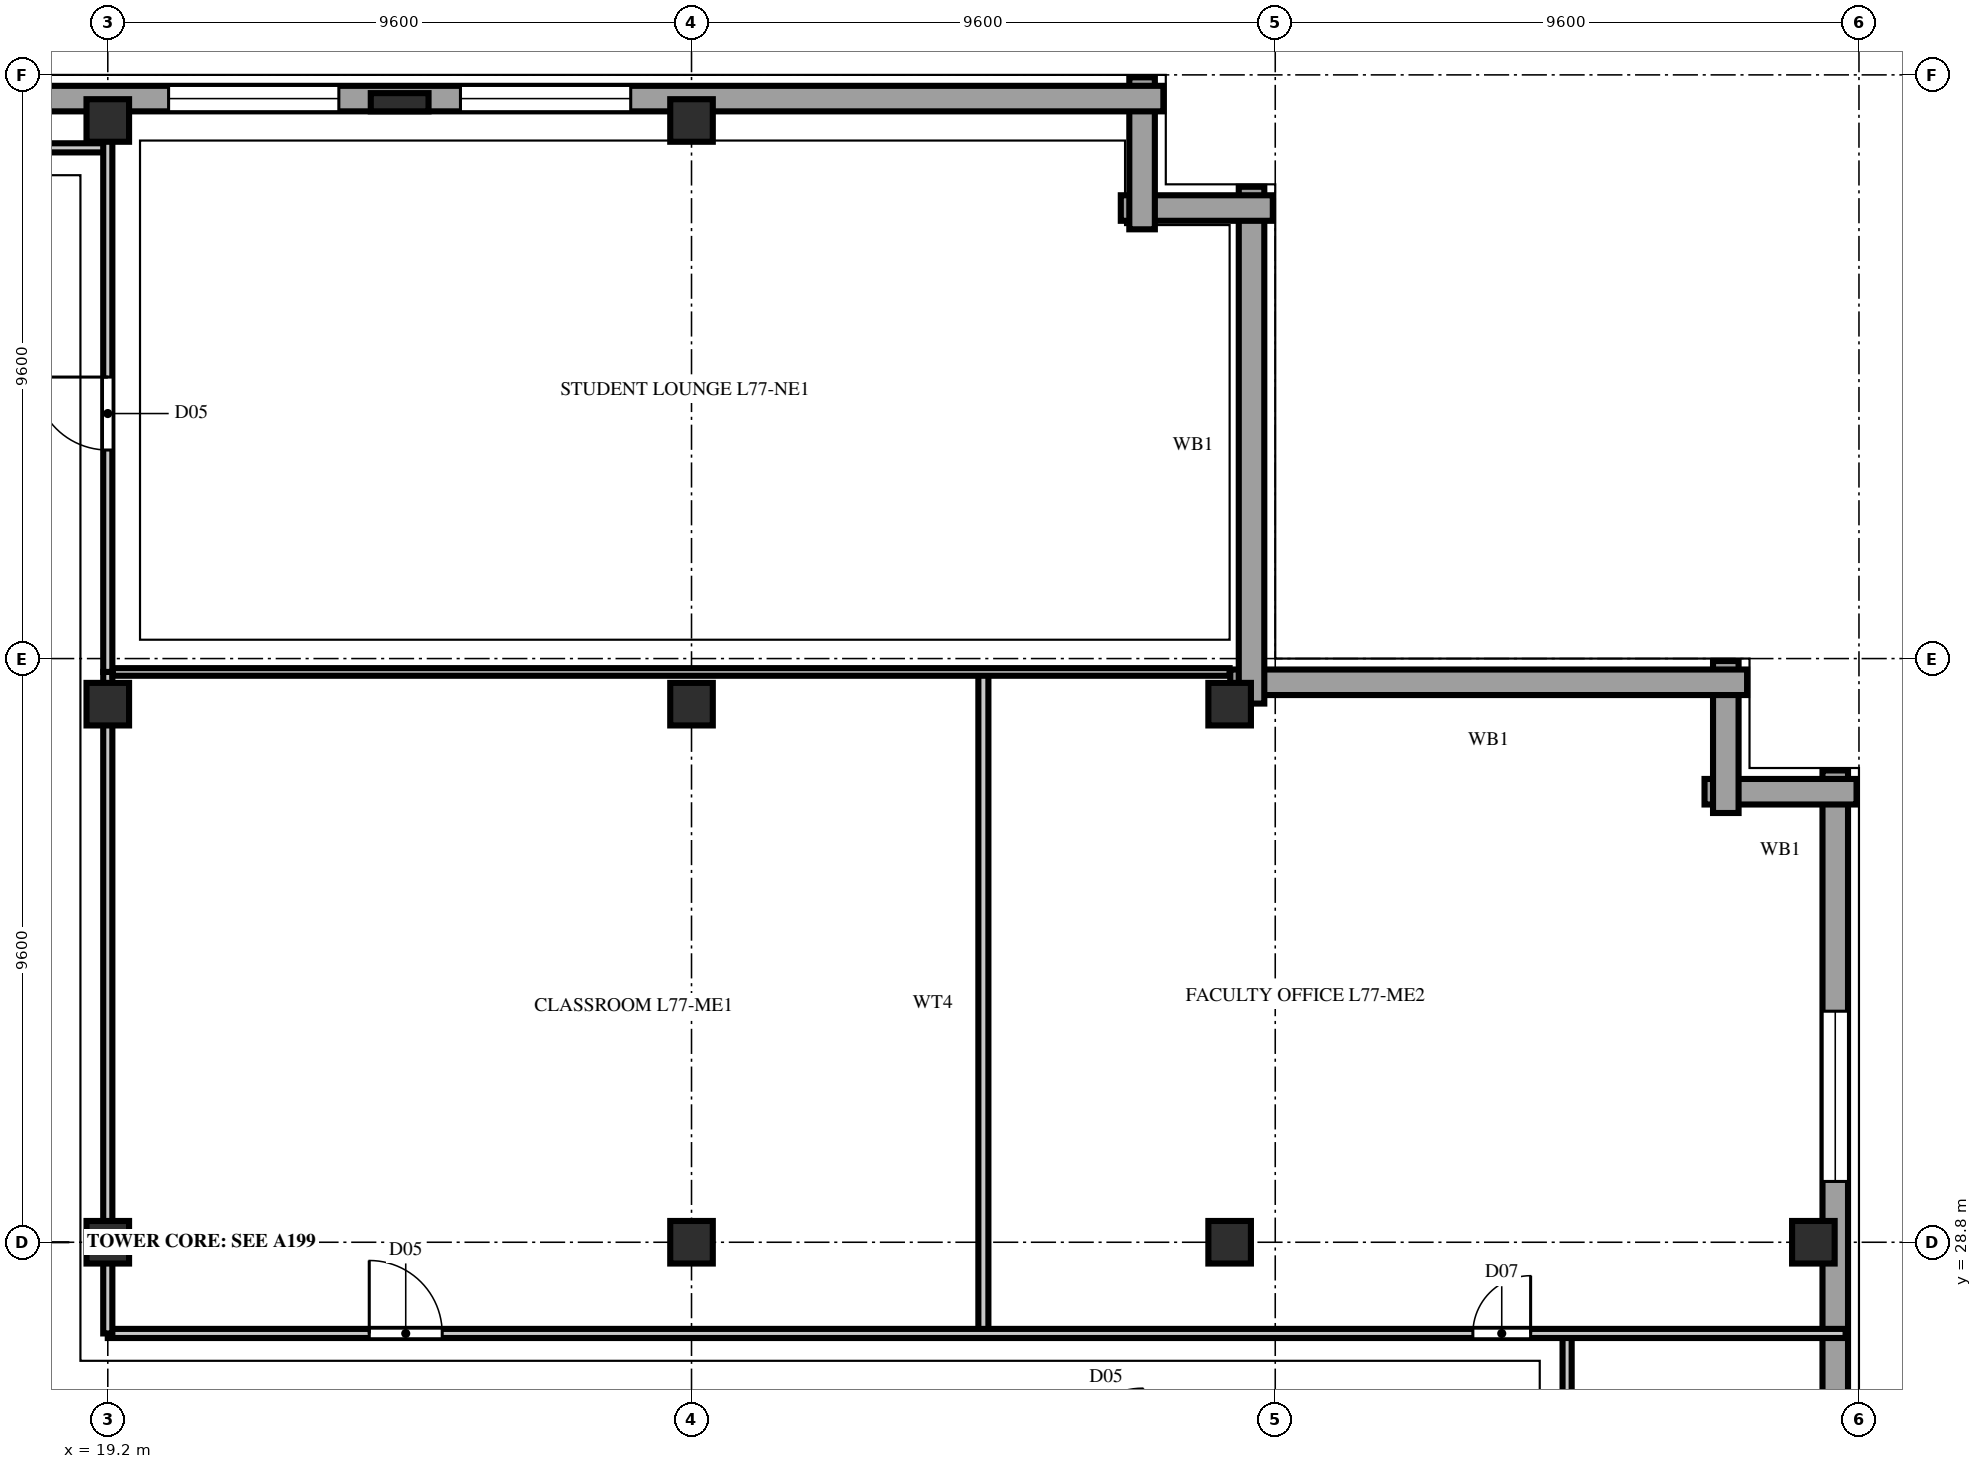
"""IFC4 building model, lengths in metres.
Left out: names, types, materials, properties, quantities, classifications, styles, units other than length and angle.
Written with IfcOpenShell. Run it as: python <this file> out.ifc"""

import sys

from ifc_helpers import new_model, si_unit, direction, frame, frame_2d, origin, origin_2d, place, context, subcontext, project, spatial, rectangle, extrude, element, fill, save


model = new_model("IFC4")
c1 = context("Model", 3, precision=1e-05, world=origin(), true_north=direction((0.0, 1.0)))
c2 = subcontext(c1, "Body", "Model", "MODEL_VIEW")
j1 = project(units=[si_unit("LENGTHUNIT", "METRE"), si_unit("PLANEANGLEUNIT", "RADIAN")], contexts=[c1])
p1 = place(None, origin())
s1 = spatial("IfcSite", under=j1, at=p1, CompositionType="ELEMENT")
p2 = place(p1, origin())
s2 = spatial("IfcBuilding", under=s1, at=p2, CompositionType="ELEMENT")
p3 = place(p2, frame((0.0, 0.0, 303.8)))
s3 = spatial("IfcBuildingStorey", under=s2, at=p3, CompositionType="ELEMENT", Elevation=303.8)
for number, where, z_axis, x_axis in (
    (1, (19.2, 28.8, 0.0), (0.0, 0.0, 1.0), (1.0, 0.0, 0.0)),
    (2, (19.2, 37.65, 0.0), (0.0, 0.0, 1.0), (1.0, 0.0, 0.0)),
    (3, (19.2, 47.25, 0.0), (0.0, 0.0, 1.0), (1.0, 0.0, 0.0)),
    (4, (28.8, 28.8, 0.0), (0.0, 0.0, 1.0), (1.0, 0.0, 0.0)),
    (5, (28.8, 37.65, 0.0), (0.0, 0.0, 1.0), (1.0, 0.0, 0.0)),
    (6, (28.8, 47.25, 0.0), (0.0, 0.0, 1.0), (1.0, 0.0, 0.0)),
    (7, (37.65, 28.8, 0.0), (0.0, 0.0, 1.0), (1.0, 0.0, 0.0)),
    (8, (37.65, 37.65, 0.0), (0.0, 0.0, 1.0), (1.0, 0.0, 0.0)),
    (9, (47.25, 28.8, 0.0), (0.0, 0.0, 1.0), (1.0, 0.0, 0.0)),
):
    element("IfcColumn", number, at=place(p3, frame(where, z_axis=z_axis, x_axis=x_axis)), inside=s3, PredefinedType="COLUMN", context=c2, shape_type="SweptSolid", body=[
        extrude(rectangle(XDim=0.7, YDim=0.7, at=origin_2d()), origin(), (0.0, 0.0, 1.0), 4.2),
    ])
p4 = place(p3, frame((24.0, 47.55, 0.0), z_axis=(0.0, 0.0, 1.0), x_axis=(1.0, 0.0, 0.0)))
e10 = element("IfcColumn", 10, at=p4, inside=s3, PredefinedType="PILASTER", context=c2, shape_type="SweptSolid", body=[
    extrude(rectangle(XDim=0.95, YDim=0.3, at=origin_2d()), origin(), (0.0, 0.0, 1.0), 4.2),
])
p5 = place(p3, frame((47.61, 1.84, 0.0), z_axis=(0.0, 0.0, 1.0), x_axis=(0.0, 1.0, 0.0)))
e11 = element("IfcWall", 11, at=p5, inside=s3, PredefinedType="SOLIDWALL", context=c2, shape_type="SweptSolid", body=[
    extrude(rectangle(XDim=34.72, YDim=0.42, at=frame_2d((17.36, 0.0))), origin(), (0.0, 0.0, 1.0), 3.88),
])
p6 = place(p5, frame((3.96, 0.0, 0.75)))
e12 = element("IfcOpeningElement", 12, at=p6, cuts=e11, PredefinedType="OPENING", context=c2, shape_type="SweptSolid", body=[
    extrude(rectangle(XDim=2.8, YDim=2.3, at=frame_2d((1.4, 1.15))), frame((0.0, 0.222, 0.0), z_axis=(0.0, -1.0, 0.0), x_axis=(1.0, 0.0, 0.0)), (0.0, 0.0, 1.0), 0.444),
])
p7 = place(p5, frame((8.76, 0.0, 0.75)))
e13 = element("IfcOpeningElement", 13, at=p7, cuts=e11, PredefinedType="OPENING", context=c2, shape_type="SweptSolid", body=[
    extrude(rectangle(XDim=2.8, YDim=2.3, at=frame_2d((1.4, 1.15))), frame((0.0, 0.222, 0.0), z_axis=(0.0, -1.0, 0.0), x_axis=(1.0, 0.0, 0.0)), (0.0, 0.0, 1.0), 0.444),
])
p8 = place(p5, frame((13.56, 0.0, 0.75)))
e14 = element("IfcOpeningElement", 14, at=p8, cuts=e11, PredefinedType="OPENING", context=c2, shape_type="SweptSolid", body=[
    extrude(rectangle(XDim=2.8, YDim=2.3, at=frame_2d((1.4, 1.15))), frame((0.0, 0.222, 0.0), z_axis=(0.0, -1.0, 0.0), x_axis=(1.0, 0.0, 0.0)), (0.0, 0.0, 1.0), 0.444),
])
p9 = place(p5, frame((18.36, 0.0, 0.75)))
e15 = element("IfcOpeningElement", 15, at=p9, cuts=e11, PredefinedType="OPENING", context=c2, shape_type="SweptSolid", body=[
    extrude(rectangle(XDim=2.8, YDim=2.3, at=frame_2d((1.4, 1.15))), frame((0.0, 0.222, 0.0), z_axis=(0.0, -1.0, 0.0), x_axis=(1.0, 0.0, 0.0)), (0.0, 0.0, 1.0), 0.444),
])
p10 = place(p5, frame((27.96, 0.0, 0.75)))
e16 = element("IfcOpeningElement", 16, at=p10, cuts=e11, PredefinedType="OPENING", context=c2, shape_type="SweptSolid", body=[
    extrude(rectangle(XDim=2.8, YDim=2.3, at=frame_2d((1.4, 1.15))), frame((0.0, 0.222, 0.0), z_axis=(0.0, -1.0, 0.0), x_axis=(1.0, 0.0, 0.0)), (0.0, 0.0, 1.0), 0.444),
])
for number, where, z_axis, x_axis in (
    (17, (47.96, 36.21, 0.0), (0.0, 0.0, 1.0), (-1.0, 0.0, 0.0)),
    (18, (45.81, 35.86, 0.0), (0.0, 0.0, 1.0), (0.0, 1.0, 0.0)),
):
    element("IfcWall", number, at=place(p3, frame(where, z_axis=z_axis, x_axis=x_axis)), inside=s3, PredefinedType="SOLIDWALL", context=c2, shape_type="SweptSolid", body=[
        extrude(rectangle(XDim=2.5, YDim=0.42, at=frame_2d((1.25, 0.0))), origin(), (0.0, 0.0, 1.0), 3.88),
    ])
for number, where, z_axis, x_axis in (
    (19, (46.16, 38.01, 0.0), (0.0, 0.0, 1.0), (-1.0, 0.0, 0.0)),
    (20, (38.01, 37.66, 0.0), (0.0, 0.0, 1.0), (0.0, 1.0, 0.0)),
):
    element("IfcWall", number, at=place(p3, frame(where, z_axis=z_axis, x_axis=x_axis)), inside=s3, PredefinedType="SOLIDWALL", context=c2, shape_type="SweptSolid", body=[
        extrude(rectangle(XDim=8.5, YDim=0.42, at=frame_2d((4.25, 0.0))), origin(), (0.0, 0.0, 1.0), 3.88),
    ])
for number, where, z_axis, x_axis in (
    (21, (38.36, 45.81, 0.0), (0.0, 0.0, 1.0), (-1.0, 0.0, 0.0)),
    (22, (36.21, 45.46, 0.0), (0.0, 0.0, 1.0), (0.0, 1.0, 0.0)),
):
    element("IfcWall", number, at=place(p3, frame(where, z_axis=z_axis, x_axis=x_axis)), inside=s3, PredefinedType="SOLIDWALL", context=c2, shape_type="SweptSolid", body=[
        extrude(rectangle(XDim=2.5, YDim=0.42, at=frame_2d((1.25, 0.0))), origin(), (0.0, 0.0, 1.0), 3.88),
    ])
p11 = place(p3, frame((36.56, 47.61, 0.0), z_axis=(0.0, 0.0, 1.0), x_axis=(-1.0, 0.0, 0.0)))
e23 = element("IfcWall", 23, at=p11, inside=s3, PredefinedType="SOLIDWALL", context=c2, shape_type="SweptSolid", body=[
    extrude(rectangle(XDim=34.085, YDim=0.42, at=frame_2d((17.042, 0.0))), origin(), (0.0, 0.0, 1.0), 3.88),
])
p12 = place(p11, frame((8.76, 0.0, 0.75)))
e24 = element("IfcOpeningElement", 24, at=p12, cuts=e23, PredefinedType="OPENING", context=c2, shape_type="SweptSolid", body=[
    extrude(rectangle(XDim=2.8, YDim=2.3, at=frame_2d((1.4, 1.15))), frame((0.0, 0.222, 0.0), z_axis=(0.0, -1.0, 0.0), x_axis=(1.0, 0.0, 0.0)), (0.0, 0.0, 1.0), 0.444),
])
p13 = place(p11, frame((13.56, 0.0, 0.75)))
e25 = element("IfcOpeningElement", 25, at=p13, cuts=e23, PredefinedType="OPENING", context=c2, shape_type="SweptSolid", body=[
    extrude(rectangle(XDim=2.8, YDim=2.3, at=frame_2d((1.4, 1.15))), frame((0.0, 0.222, 0.0), z_axis=(0.0, -1.0, 0.0), x_axis=(1.0, 0.0, 0.0)), (0.0, 0.0, 1.0), 0.444),
])
p14 = place(p3, frame((17.05, 46.8, 0.0), z_axis=(0.0, 0.0, 1.0), x_axis=(1.0, 0.0, 0.0)))
e26 = element("IfcWall", 26, at=p14, inside=s3, PredefinedType="PARTITIONING", context=c2, shape_type="SweptSolid", body=[
    extrude(rectangle(XDim=2.15, YDim=0.15, at=frame_2d((1.075, 0.0))), origin(), (0.0, 0.0, 1.0), 3.88),
])
p15 = place(p3, frame((43.2, 25.2, 0.0), z_axis=(0.0, 0.0, 1.0), x_axis=(0.0, 1.0, 0.0)))
e27 = element("IfcWall", 27, at=p15, inside=s3, PredefinedType="PARTITIONING", context=c2, shape_type="SweptSolid", body=[
    extrude(rectangle(XDim=2.1, YDim=0.15, at=frame_2d((1.05, 0.0))), origin(), (0.0, 0.0, 1.0), 3.88),
])
p16 = place(p3, frame((33.6, 27.3, 0.0), z_axis=(0.0, 0.0, 1.0), x_axis=(0.0, 1.0, 0.0)))
e28 = element("IfcWall", 28, at=p16, inside=s3, PredefinedType="PLUMBINGWALL", context=c2, shape_type="SweptSolid", body=[
    extrude(rectangle(XDim=10.88, YDim=0.165, at=frame_2d((5.44, 0.0))), origin(), (0.0, 0.0, 1.0), 3.88),
])
p17 = place(p3, frame((19.2, 27.3, 0.0), z_axis=(0.0, 0.0, 1.0), x_axis=(1.0, 0.0, 0.0)))
e29 = element("IfcWall", 29, at=p17, inside=s3, PredefinedType="PARTITIONING", context=c2, shape_type="SweptSolid", body=[
    extrude(rectangle(XDim=28.58, YDim=0.15, at=frame_2d((14.29, 0.0))), origin(), (0.0, 0.0, 1.0), 3.88),
])
p18 = place(p17, frame((4.3, 0.0, 0.0)))
e30 = element("IfcOpeningElement", 30, at=p18, cuts=e29, PredefinedType="OPENING", context=c2, shape_type="SweptSolid", body=[
    extrude(rectangle(XDim=1.2, YDim=2.2, at=frame_2d((0.6, 1.1))), frame((0.0, 0.087, 0.0), z_axis=(0.0, -1.0, 0.0), x_axis=(1.0, 0.0, 0.0)), (0.0, 0.0, 1.0), 0.174),
])
p19 = place(p17, frame((22.45, 0.0, 0.0)))
e31 = element("IfcOpeningElement", 31, at=p19, cuts=e29, PredefinedType="OPENING", context=c2, shape_type="SweptSolid", body=[
    extrude(rectangle(XDim=0.95, YDim=2.15, at=frame_2d((0.475, 1.075))), frame((0.0, 0.087, 0.0), z_axis=(0.0, -1.0, 0.0), x_axis=(1.0, 0.0, 0.0)), (0.0, 0.0, 1.0), 0.174),
])
p20 = place(p3, frame((19.2, 27.3, 0.0), z_axis=(0.0, 0.0, 1.0), x_axis=(0.0, 1.0, 0.0)))
e32 = element("IfcWall", 32, at=p20, inside=s3, PredefinedType="PARTITIONING", context=c2, shape_type="SweptSolid", body=[
    extrude(rectangle(XDim=10.88, YDim=0.15, at=frame_2d((5.44, 0.0))), origin(), (0.0, 0.0, 1.0), 3.572),
])
p21 = place(p3, frame((19.28, 38.18, 0.0), z_axis=(0.0, 0.0, 1.0), x_axis=(1.0, 0.0, 0.0)))
e33 = element("IfcWall", 33, at=p21, inside=s3, PredefinedType="PARTITIONING", context=c2, shape_type="SweptSolid", body=[
    extrude(rectangle(XDim=18.37, YDim=0.125, at=frame_2d((9.185, 0.0))), origin(), (0.0, 0.0, 1.0), 3.88),
])
p22 = place(p3, frame((19.2, 38.18, 0.0), z_axis=(0.0, 0.0, 1.0), x_axis=(0.0, 1.0, 0.0)))
e34 = element("IfcWall", 34, at=p22, inside=s3, PredefinedType="PARTITIONING", context=c2, shape_type="SweptSolid", body=[
    extrude(rectangle(XDim=9.27, YDim=0.15, at=frame_2d((4.635, 0.0))), origin(), (0.0, 0.0, 1.0), 3.572),
])
p23 = place(p22, frame((3.65, 0.0, 0.0)))
e35 = element("IfcOpeningElement", 35, at=p23, cuts=e34, PredefinedType="OPENING", context=c2, shape_type="SweptSolid", body=[
    extrude(rectangle(XDim=1.2, YDim=2.2, at=frame_2d((0.6, 1.1))), frame((0.0, 0.087, 0.0), z_axis=(0.0, -1.0, 0.0), x_axis=(1.0, 0.0, 0.0)), (0.0, 0.0, 1.0), 0.174),
])
p24 = place(p10, origin())
e36 = element("IfcWindow", 36, at=p24, inside=s3, PartitioningType="TRIPLE_PANEL_VERTICAL", PredefinedType="WINDOW", context=c2, shape_type="SweptSolid", body=[
    extrude(rectangle(XDim=2.8, YDim=2.3, at=frame_2d((1.4, 1.15))), frame((0.0, 0.11, 0.0), z_axis=(0.0, -1.0, 0.0), x_axis=(1.0, 0.0, 0.0)), (0.0, 0.0, 1.0), 0.06),
])
fill(e16, e36)
p25 = place(p12, origin())
e37 = element("IfcWindow", 37, at=p25, inside=s3, PartitioningType="TRIPLE_PANEL_VERTICAL", PredefinedType="WINDOW", context=c2, shape_type="SweptSolid", body=[
    extrude(rectangle(XDim=2.8, YDim=2.3, at=frame_2d((1.4, 1.15))), frame((0.0, 0.11, 0.0), z_axis=(0.0, -1.0, 0.0), x_axis=(1.0, 0.0, 0.0)), (0.0, 0.0, 1.0), 0.06),
])
fill(e24, e37)
p26 = place(p13, origin())
e38 = element("IfcWindow", 38, at=p26, inside=s3, PartitioningType="TRIPLE_PANEL_VERTICAL", PredefinedType="WINDOW", context=c2, shape_type="SweptSolid", body=[
    extrude(rectangle(XDim=2.8, YDim=2.3, at=frame_2d((1.4, 1.15))), frame((0.0, 0.11, 0.0), z_axis=(0.0, -1.0, 0.0), x_axis=(1.0, 0.0, 0.0)), (0.0, 0.0, 1.0), 0.06),
])
fill(e25, e38)
p27 = place(p18, origin())
e39 = element("IfcDoor", 39, at=p27, inside=s3, OperationType="SINGLE_SWING_LEFT", PredefinedType="DOOR", context=c2, shape_type="SweptSolid", body=[
    extrude(rectangle(XDim=1.2, YDim=2.2, at=frame_2d((0.6, 1.1))), frame((0.0, 0.025, 0.0), z_axis=(0.0, -1.0, 0.0), x_axis=(1.0, 0.0, 0.0)), (0.0, 0.0, 1.0), 0.05),
])
fill(e30, e39)
p28 = place(p19, origin())
e40 = element("IfcDoor", 40, at=p28, inside=s3, OperationType="SINGLE_SWING_RIGHT", PredefinedType="DOOR", context=c2, shape_type="SweptSolid", body=[
    extrude(rectangle(XDim=0.95, YDim=2.15, at=frame_2d((0.475, 1.075))), frame((0.0, 0.025, 0.0), z_axis=(0.0, -1.0, 0.0), x_axis=(1.0, 0.0, 0.0)), (0.0, 0.0, 1.0), 0.05),
])
fill(e31, e40)
p29 = place(p23, origin())
e41 = element("IfcDoor", 41, at=p29, inside=s3, OperationType="SINGLE_SWING_RIGHT", PredefinedType="DOOR", context=c2, shape_type="SweptSolid", body=[
    extrude(rectangle(XDim=1.2, YDim=2.2, at=frame_2d((0.6, 1.1))), frame((0.0, 0.025, 0.0), z_axis=(0.0, -1.0, 0.0), x_axis=(1.0, 0.0, 0.0)), (0.0, 0.0, 1.0), 0.05),
])
fill(e35, e41)
save(model, sys.argv[1])
